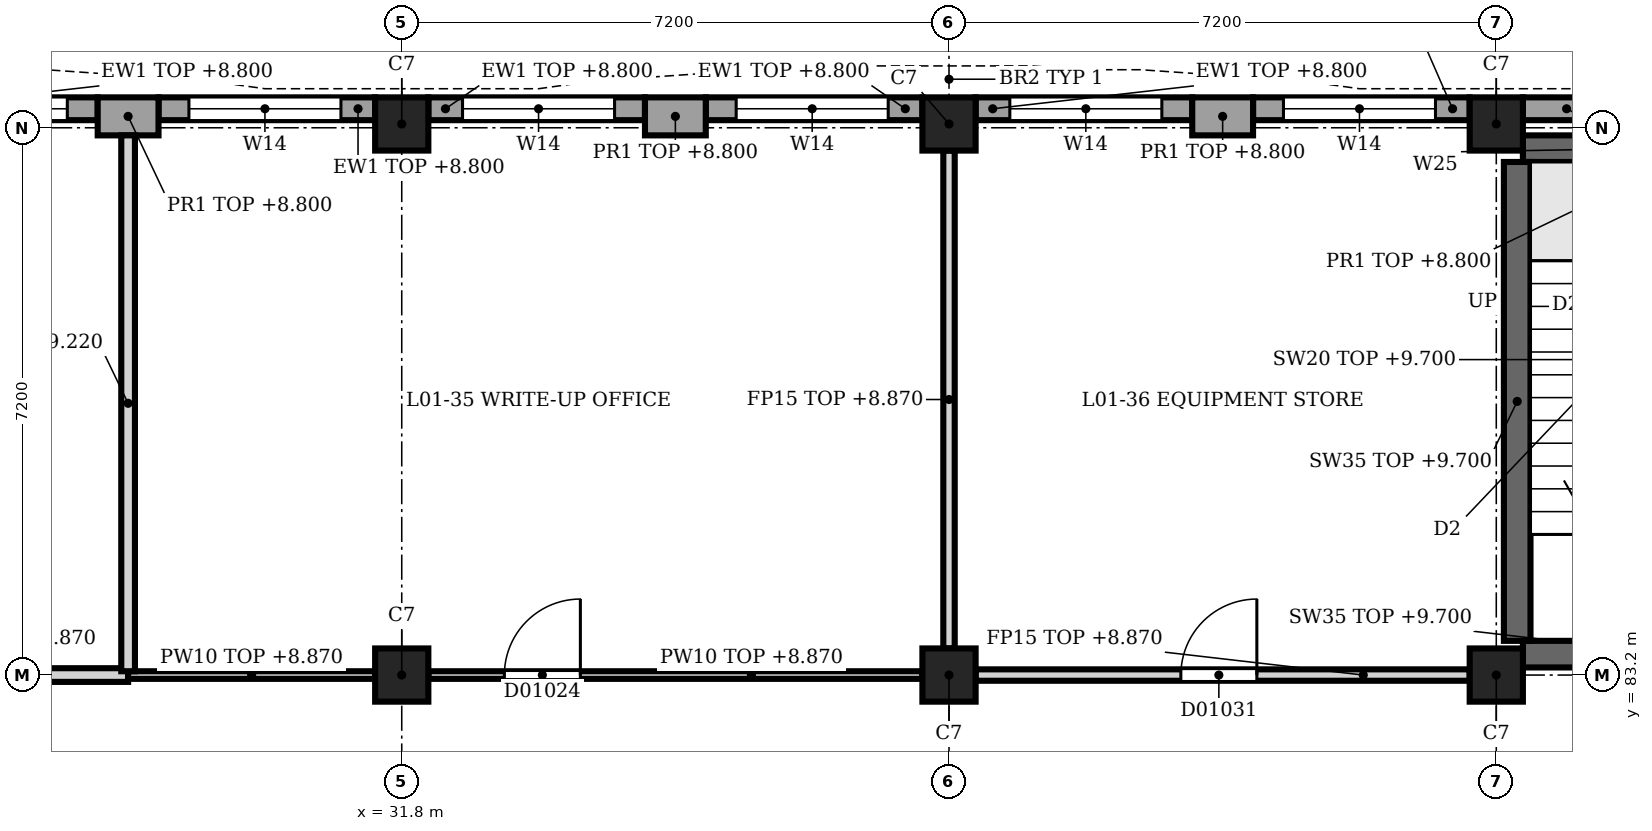
"""IFC4 building model, lengths in metres.
Left out: names, types, materials, properties, quantities, classifications, styles, units other than length and angle.
Written with IfcOpenShell. Run it as: python <this file> out.ifc"""

import sys

from ifc_helpers import new_model, si_unit, direction, frame, frame_2d, origin, origin_2d, place, context, subcontext, project, spatial, rectangle, extrude, element, fill, save


model = new_model("IFC4")
c1 = context("Model", 3, precision=1e-05, world=origin(), true_north=direction((0.0, 1.0)))
c2 = subcontext(c1, "Body", "Model", "MODEL_VIEW")
j1 = project(units=[si_unit("LENGTHUNIT", "METRE"), si_unit("PLANEANGLEUNIT", "RADIAN")], contexts=[c1])
p1 = place(None, origin())
s1 = spatial("IfcSite", under=j1, at=p1, CompositionType="ELEMENT")
p2 = place(p1, origin())
s2 = spatial("IfcBuilding", under=s1, at=p2, CompositionType="ELEMENT")
p3 = place(p2, frame((0.0, 0.0, 5.4)))
s3 = spatial("IfcBuildingStorey", under=s2, at=p3, CompositionType="ELEMENT", Elevation=5.4)
for number, where, z_axis, x_axis in (
    (1, (31.8, 83.2, 0.0), (0.0, 0.0, 1.0), (1.0, 0.0, 0.0)),
    (2, (31.8, 90.45, 0.0), (0.0, 0.0, 1.0), (1.0, 0.0, 0.0)),
    (3, (39.0, 83.2, 0.0), (0.0, 0.0, 1.0), (1.0, 0.0, 0.0)),
    (4, (39.0, 90.45, 0.0), (0.0, 0.0, 1.0), (1.0, 0.0, 0.0)),
    (5, (46.2, 83.2, 0.0), (0.0, 0.0, 1.0), (1.0, 0.0, 0.0)),
    (6, (46.2, 90.45, 0.0), (0.0, 0.0, 1.0), (1.0, 0.0, 0.0)),
):
    element("IfcColumn", number, at=place(p3, frame(where, z_axis=z_axis, x_axis=x_axis)), inside=s3, PredefinedType="COLUMN", context=c2, shape_type="SweptSolid", body=[
        extrude(rectangle(XDim=0.7, YDim=0.7, at=origin_2d()), origin(), (0.0, 0.0, 1.0), 4.5),
    ])
for number, where, z_axis, x_axis in (
    (7, (27.8, 90.55, 0.0), (0.0, 0.0, 1.0), (1.0, 0.0, 0.0)),
    (8, (35.0, 90.55, 0.0), (0.0, 0.0, 1.0), (1.0, 0.0, 0.0)),
    (9, (42.2, 90.55, 0.0), (0.0, 0.0, 1.0), (1.0, 0.0, 0.0)),
):
    element("IfcWall", number, at=place(p3, frame(where, z_axis=z_axis, x_axis=x_axis)), inside=s3, PredefinedType="SOLIDWALL", context=c2, shape_type="SweptSolid", body=[
        extrude(rectangle(XDim=0.8, YDim=0.5, at=frame_2d((0.4, 0.0))), origin(), (0.0, 0.0, 1.0), 3.4),
    ])
p4 = place(p3, frame((24.95, 90.65, 0.0), z_axis=(0.0, 0.0, 1.0), x_axis=(1.0, 0.0, 0.0)))
e10 = element("IfcWall", 10, at=p4, inside=s3, PredefinedType="SOLIDWALL", context=c2, shape_type="SweptSolid", body=[
    extrude(rectangle(XDim=2.85, YDim=0.3, at=frame_2d((1.425, 0.0))), origin(), (0.0, 0.0, 1.0), 3.4),
])
p5 = place(p4, frame((0.45, 0.0, 0.9)))
e11 = element("IfcOpeningElement", 11, at=p5, cuts=e10, PredefinedType="OPENING", context=c2, shape_type="SweptSolid", body=[
    extrude(rectangle(XDim=2.0, YDim=2.4, at=frame_2d((1.0, 1.2))), frame((0.0, 0.16, 0.0), z_axis=(0.0, -1.0, 0.0), x_axis=(1.0, 0.0, 0.0)), (0.0, 0.0, 1.0), 0.32),
])
p6 = place(p3, frame((28.6, 90.65, 0.0), z_axis=(0.0, 0.0, 1.0), x_axis=(1.0, 0.0, 0.0)))
e12 = element("IfcWall", 12, at=p6, inside=s3, PredefinedType="SOLIDWALL", context=c2, shape_type="SweptSolid", body=[
    extrude(rectangle(XDim=2.85, YDim=0.3, at=frame_2d((1.425, 0.0))), origin(), (0.0, 0.0, 1.0), 3.4),
])
p7 = place(p6, frame((0.4, 0.0, 0.9)))
e13 = element("IfcOpeningElement", 13, at=p7, cuts=e12, PredefinedType="OPENING", context=c2, shape_type="SweptSolid", body=[
    extrude(rectangle(XDim=2.0, YDim=2.4, at=frame_2d((1.0, 1.2))), frame((0.0, 0.16, 0.0), z_axis=(0.0, -1.0, 0.0), x_axis=(1.0, 0.0, 0.0)), (0.0, 0.0, 1.0), 0.32),
])
p8 = place(p3, frame((32.15, 90.65, 0.0), z_axis=(0.0, 0.0, 1.0), x_axis=(1.0, 0.0, 0.0)))
e14 = element("IfcWall", 14, at=p8, inside=s3, PredefinedType="SOLIDWALL", context=c2, shape_type="SweptSolid", body=[
    extrude(rectangle(XDim=2.85, YDim=0.3, at=frame_2d((1.425, 0.0))), origin(), (0.0, 0.0, 1.0), 3.4),
])
p9 = place(p8, frame((0.45, 0.0, 0.9)))
e15 = element("IfcOpeningElement", 15, at=p9, cuts=e14, PredefinedType="OPENING", context=c2, shape_type="SweptSolid", body=[
    extrude(rectangle(XDim=2.0, YDim=2.4, at=frame_2d((1.0, 1.2))), frame((0.0, 0.16, 0.0), z_axis=(0.0, -1.0, 0.0), x_axis=(1.0, 0.0, 0.0)), (0.0, 0.0, 1.0), 0.32),
])
p10 = place(p3, frame((35.8, 90.65, 0.0), z_axis=(0.0, 0.0, 1.0), x_axis=(1.0, 0.0, 0.0)))
e16 = element("IfcWall", 16, at=p10, inside=s3, PredefinedType="SOLIDWALL", context=c2, shape_type="SweptSolid", body=[
    extrude(rectangle(XDim=2.85, YDim=0.3, at=frame_2d((1.425, 0.0))), origin(), (0.0, 0.0, 1.0), 3.4),
])
p11 = place(p10, frame((0.4, 0.0, 0.9)))
e17 = element("IfcOpeningElement", 17, at=p11, cuts=e16, PredefinedType="OPENING", context=c2, shape_type="SweptSolid", body=[
    extrude(rectangle(XDim=2.0, YDim=2.4, at=frame_2d((1.0, 1.2))), frame((0.0, 0.16, 0.0), z_axis=(0.0, -1.0, 0.0), x_axis=(1.0, 0.0, 0.0)), (0.0, 0.0, 1.0), 0.32),
])
p12 = place(p3, frame((39.35, 90.65, 0.0), z_axis=(0.0, 0.0, 1.0), x_axis=(1.0, 0.0, 0.0)))
e18 = element("IfcWall", 18, at=p12, inside=s3, PredefinedType="SOLIDWALL", context=c2, shape_type="SweptSolid", body=[
    extrude(rectangle(XDim=2.85, YDim=0.3, at=frame_2d((1.425, 0.0))), origin(), (0.0, 0.0, 1.0), 3.4),
])
p13 = place(p12, frame((0.45, 0.0, 0.9)))
e19 = element("IfcOpeningElement", 19, at=p13, cuts=e18, PredefinedType="OPENING", context=c2, shape_type="SweptSolid", body=[
    extrude(rectangle(XDim=2.0, YDim=2.4, at=frame_2d((1.0, 1.2))), frame((0.0, 0.16, 0.0), z_axis=(0.0, -1.0, 0.0), x_axis=(1.0, 0.0, 0.0)), (0.0, 0.0, 1.0), 0.32),
])
p14 = place(p3, frame((43.0, 90.65, 0.0), z_axis=(0.0, 0.0, 1.0), x_axis=(1.0, 0.0, 0.0)))
e20 = element("IfcWall", 20, at=p14, inside=s3, PredefinedType="SOLIDWALL", context=c2, shape_type="SweptSolid", body=[
    extrude(rectangle(XDim=2.85, YDim=0.3, at=frame_2d((1.425, 0.0))), origin(), (0.0, 0.0, 1.0), 3.4),
])
p15 = place(p14, frame((0.4, 0.0, 0.9)))
e21 = element("IfcOpeningElement", 21, at=p15, cuts=e20, PredefinedType="OPENING", context=c2, shape_type="SweptSolid", body=[
    extrude(rectangle(XDim=2.0, YDim=2.4, at=frame_2d((1.0, 1.2))), frame((0.0, 0.16, 0.0), z_axis=(0.0, -1.0, 0.0), x_axis=(1.0, 0.0, 0.0)), (0.0, 0.0, 1.0), 0.32),
])
p16 = place(p3, frame((46.55, 90.65, 0.0), z_axis=(0.0, 0.0, 1.0), x_axis=(1.0, 0.0, 0.0)))
e22 = element("IfcWall", 22, at=p16, inside=s3, PredefinedType="SOLIDWALL", context=c2, shape_type="SweptSolid", body=[
    extrude(rectangle(XDim=2.85, YDim=0.3, at=frame_2d((1.425, 0.0))), origin(), (0.0, 0.0, 1.0), 3.4),
])
p17 = place(p16, frame((1.15, 0.0, 1.2)))
e23 = element("IfcOpeningElement", 23, at=p17, cuts=e22, PredefinedType="OPENING", context=c2, shape_type="SweptSolid", body=[
    extrude(rectangle(XDim=0.6, YDim=1.8, at=frame_2d((0.3, 0.9))), frame((0.0, 0.16, 0.0), z_axis=(0.0, -1.0, 0.0), x_axis=(1.0, 0.0, 0.0)), (0.0, 0.0, 1.0), 0.32),
])
p18 = place(p3, frame((46.55, 83.475, 0.0), z_axis=(0.0, 0.0, 1.0), x_axis=(1.0, 0.0, 0.0)))
e24 = element("IfcWall", 24, at=p18, inside=s3, PredefinedType="SHEAR", context=c2, shape_type="SweptSolid", body=[
    extrude(rectangle(XDim=6.5, YDim=0.35, at=frame_2d((3.25, 0.0))), origin(), (0.0, 0.0, 1.0), 4.3),
])
p19 = place(p18, frame((3.85, 0.0, 0.0)))
e25 = element("IfcOpeningElement", 25, at=p19, cuts=e24, PredefinedType="OPENING", context=c2, shape_type="SweptSolid", body=[
    extrude(rectangle(XDim=1.2, YDim=2.1, at=frame_2d((0.6, 1.05))), frame((0.0, 0.185, 0.0), z_axis=(0.0, -1.0, 0.0), x_axis=(1.0, 0.0, 0.0)), (0.0, 0.0, 1.0), 0.37),
])
p20 = place(p3, frame((46.55, 90.125, 0.0), z_axis=(0.0, 0.0, 1.0), x_axis=(1.0, 0.0, 0.0)))
e26 = element("IfcWall", 26, at=p20, inside=s3, PredefinedType="SHEAR", context=c2, shape_type="SweptSolid", body=[
    extrude(rectangle(XDim=6.5, YDim=0.35, at=frame_2d((3.25, 0.0))), origin(), (0.0, 0.0, 1.0), 4.3),
])
p21 = place(p20, frame((1.15, 0.0, 1.2)))
e27 = element("IfcOpeningElement", 27, at=p21, cuts=e26, PredefinedType="OPENING", context=c2, shape_type="SweptSolid", body=[
    extrude(rectangle(XDim=0.6, YDim=1.8, at=frame_2d((0.3, 0.9))), frame((0.0, 0.185, 0.0), z_axis=(0.0, -1.0, 0.0), x_axis=(1.0, 0.0, 0.0)), (0.0, 0.0, 1.0), 0.37),
])
p22 = place(p3, frame((46.475, 83.65, 0.0), z_axis=(0.0, 0.0, 1.0), x_axis=(0.0, 1.0, 0.0)))
e28 = element("IfcWall", 28, at=p22, inside=s3, PredefinedType="SHEAR", context=c2, shape_type="SweptSolid", body=[
    extrude(rectangle(XDim=6.3, YDim=0.35, at=frame_2d((3.15, 0.0))), origin(), (0.0, 0.0, 1.0), 4.3),
])
p23 = place(p3, frame((24.95, 83.2, 0.0), z_axis=(0.0, 0.0, 1.0), x_axis=(1.0, 0.0, 0.0)))
e29 = element("IfcWall", 29, at=p23, inside=s3, PredefinedType="PARTITIONING", context=c2, shape_type="SweptSolid", body=[
    extrude(rectangle(XDim=3.25, YDim=0.18, at=frame_2d((1.625, 0.0))), origin(), (0.0, 0.0, 1.0), 3.47),
])
p24 = place(p3, frame((28.2, 83.2, 0.0), z_axis=(0.0, 0.0, 1.0), x_axis=(1.0, 0.0, 0.0)))
e30 = element("IfcWall", 30, at=p24, inside=s3, PredefinedType="PARTITIONING", context=c2, shape_type="SweptSolid", body=[
    extrude(rectangle(XDim=3.25, YDim=0.1, at=frame_2d((1.625, 0.0))), origin(), (0.0, 0.0, 1.0), 3.47),
])
p25 = place(p3, frame((32.15, 83.2, 0.0), z_axis=(0.0, 0.0, 1.0), x_axis=(1.0, 0.0, 0.0)))
e31 = element("IfcWall", 31, at=p25, inside=s3, PredefinedType="PARTITIONING", context=c2, shape_type="SweptSolid", body=[
    extrude(rectangle(XDim=6.5, YDim=0.1, at=frame_2d((3.25, 0.0))), origin(), (0.0, 0.0, 1.0), 3.47),
])
p26 = place(p25, frame((1.0, 0.0, 0.0)))
e32 = element("IfcOpeningElement", 32, at=p26, cuts=e31, PredefinedType="OPENING", context=c2, shape_type="SweptSolid", body=[
    extrude(rectangle(XDim=1.0, YDim=2.1, at=frame_2d((0.5, 1.05))), frame((0.0, 0.06, 0.0), z_axis=(0.0, -1.0, 0.0), x_axis=(1.0, 0.0, 0.0)), (0.0, 0.0, 1.0), 0.12),
])
p27 = place(p3, frame((39.35, 83.2, 0.0), z_axis=(0.0, 0.0, 1.0), x_axis=(1.0, 0.0, 0.0)))
e33 = element("IfcWall", 33, at=p27, inside=s3, PredefinedType="PARTITIONING", context=c2, shape_type="SweptSolid", body=[
    extrude(rectangle(XDim=6.5, YDim=0.15, at=frame_2d((3.25, 0.0))), origin(), (0.0, 0.0, 1.0), 3.47),
])
p28 = place(p27, frame((2.7, 0.0, 0.0)))
e34 = element("IfcOpeningElement", 34, at=p28, cuts=e33, PredefinedType="OPENING", context=c2, shape_type="SweptSolid", body=[
    extrude(rectangle(XDim=1.0, YDim=2.1, at=frame_2d((0.5, 1.05))), frame((0.0, 0.085, 0.0), z_axis=(0.0, -1.0, 0.0), x_axis=(1.0, 0.0, 0.0)), (0.0, 0.0, 1.0), 0.17),
])
p29 = place(p3, frame((28.2, 83.25, 0.0), z_axis=(0.0, 0.0, 1.0), x_axis=(0.0, 1.0, 0.0)))
e35 = element("IfcWall", 35, at=p29, inside=s3, PredefinedType="PARTITIONING", context=c2, shape_type="SweptSolid", body=[
    extrude(rectangle(XDim=7.05, YDim=0.18, at=frame_2d((3.525, 0.0))), origin(), (0.0, 0.0, 1.0), 3.82),
])
p30 = place(p3, frame((39.0, 83.55, 0.0), z_axis=(0.0, 0.0, 1.0), x_axis=(0.0, 1.0, 0.0)))
e36 = element("IfcWall", 36, at=p30, inside=s3, PredefinedType="PARTITIONING", context=c2, shape_type="SweptSolid", body=[
    extrude(rectangle(XDim=6.55, YDim=0.15, at=frame_2d((3.275, 0.0))), origin(), (0.0, 0.0, 1.0), 3.47),
])
p31 = place(p5, origin())
e37 = element("IfcWindow", 37, at=p31, inside=s3, PartitioningType="SINGLE_PANEL", PredefinedType="WINDOW", context=c2, shape_type="SweptSolid", body=[
    extrude(rectangle(XDim=2.0, YDim=2.4, at=frame_2d((1.0, 1.2))), frame((0.0, 0.03, 0.0), z_axis=(0.0, -1.0, 0.0), x_axis=(1.0, 0.0, 0.0)), (0.0, 0.0, 1.0), 0.06),
])
fill(e11, e37)
p32 = place(p7, origin())
e38 = element("IfcWindow", 38, at=p32, inside=s3, PartitioningType="SINGLE_PANEL", PredefinedType="WINDOW", context=c2, shape_type="SweptSolid", body=[
    extrude(rectangle(XDim=2.0, YDim=2.4, at=frame_2d((1.0, 1.2))), frame((0.0, 0.03, 0.0), z_axis=(0.0, -1.0, 0.0), x_axis=(1.0, 0.0, 0.0)), (0.0, 0.0, 1.0), 0.06),
])
fill(e13, e38)
p33 = place(p9, origin())
e39 = element("IfcWindow", 39, at=p33, inside=s3, PartitioningType="SINGLE_PANEL", PredefinedType="WINDOW", context=c2, shape_type="SweptSolid", body=[
    extrude(rectangle(XDim=2.0, YDim=2.4, at=frame_2d((1.0, 1.2))), frame((0.0, 0.03, 0.0), z_axis=(0.0, -1.0, 0.0), x_axis=(1.0, 0.0, 0.0)), (0.0, 0.0, 1.0), 0.06),
])
fill(e15, e39)
p34 = place(p11, origin())
e40 = element("IfcWindow", 40, at=p34, inside=s3, PartitioningType="SINGLE_PANEL", PredefinedType="WINDOW", context=c2, shape_type="SweptSolid", body=[
    extrude(rectangle(XDim=2.0, YDim=2.4, at=frame_2d((1.0, 1.2))), frame((0.0, 0.03, 0.0), z_axis=(0.0, -1.0, 0.0), x_axis=(1.0, 0.0, 0.0)), (0.0, 0.0, 1.0), 0.06),
])
fill(e17, e40)
p35 = place(p13, origin())
e41 = element("IfcWindow", 41, at=p35, inside=s3, PartitioningType="SINGLE_PANEL", PredefinedType="WINDOW", context=c2, shape_type="SweptSolid", body=[
    extrude(rectangle(XDim=2.0, YDim=2.4, at=frame_2d((1.0, 1.2))), frame((0.0, 0.03, 0.0), z_axis=(0.0, -1.0, 0.0), x_axis=(1.0, 0.0, 0.0)), (0.0, 0.0, 1.0), 0.06),
])
fill(e19, e41)
p36 = place(p15, origin())
e42 = element("IfcWindow", 42, at=p36, inside=s3, PartitioningType="SINGLE_PANEL", PredefinedType="WINDOW", context=c2, shape_type="SweptSolid", body=[
    extrude(rectangle(XDim=2.0, YDim=2.4, at=frame_2d((1.0, 1.2))), frame((0.0, 0.03, 0.0), z_axis=(0.0, -1.0, 0.0), x_axis=(1.0, 0.0, 0.0)), (0.0, 0.0, 1.0), 0.06),
])
fill(e21, e42)
p37 = place(p26, origin())
e43 = element("IfcDoor", 43, at=p37, inside=s3, OperationType="SINGLE_SWING_LEFT", PredefinedType="DOOR", context=c2, shape_type="SweptSolid", body=[
    extrude(rectangle(XDim=1.0, YDim=2.1, at=frame_2d((0.5, 1.05))), frame((0.0, 0.025, 0.0), z_axis=(0.0, -1.0, 0.0), x_axis=(1.0, 0.0, 0.0)), (0.0, 0.0, 1.0), 0.05),
])
fill(e32, e43)
p38 = place(p28, origin())
e44 = element("IfcDoor", 44, at=p38, inside=s3, OperationType="SINGLE_SWING_LEFT", PredefinedType="DOOR", context=c2, shape_type="SweptSolid", body=[
    extrude(rectangle(XDim=1.0, YDim=2.1, at=frame_2d((0.5, 1.05))), frame((0.0, 0.025, 0.0), z_axis=(0.0, -1.0, 0.0), x_axis=(1.0, 0.0, 0.0)), (0.0, 0.0, 1.0), 0.05),
])
fill(e34, e44)
save(model, sys.argv[1])
